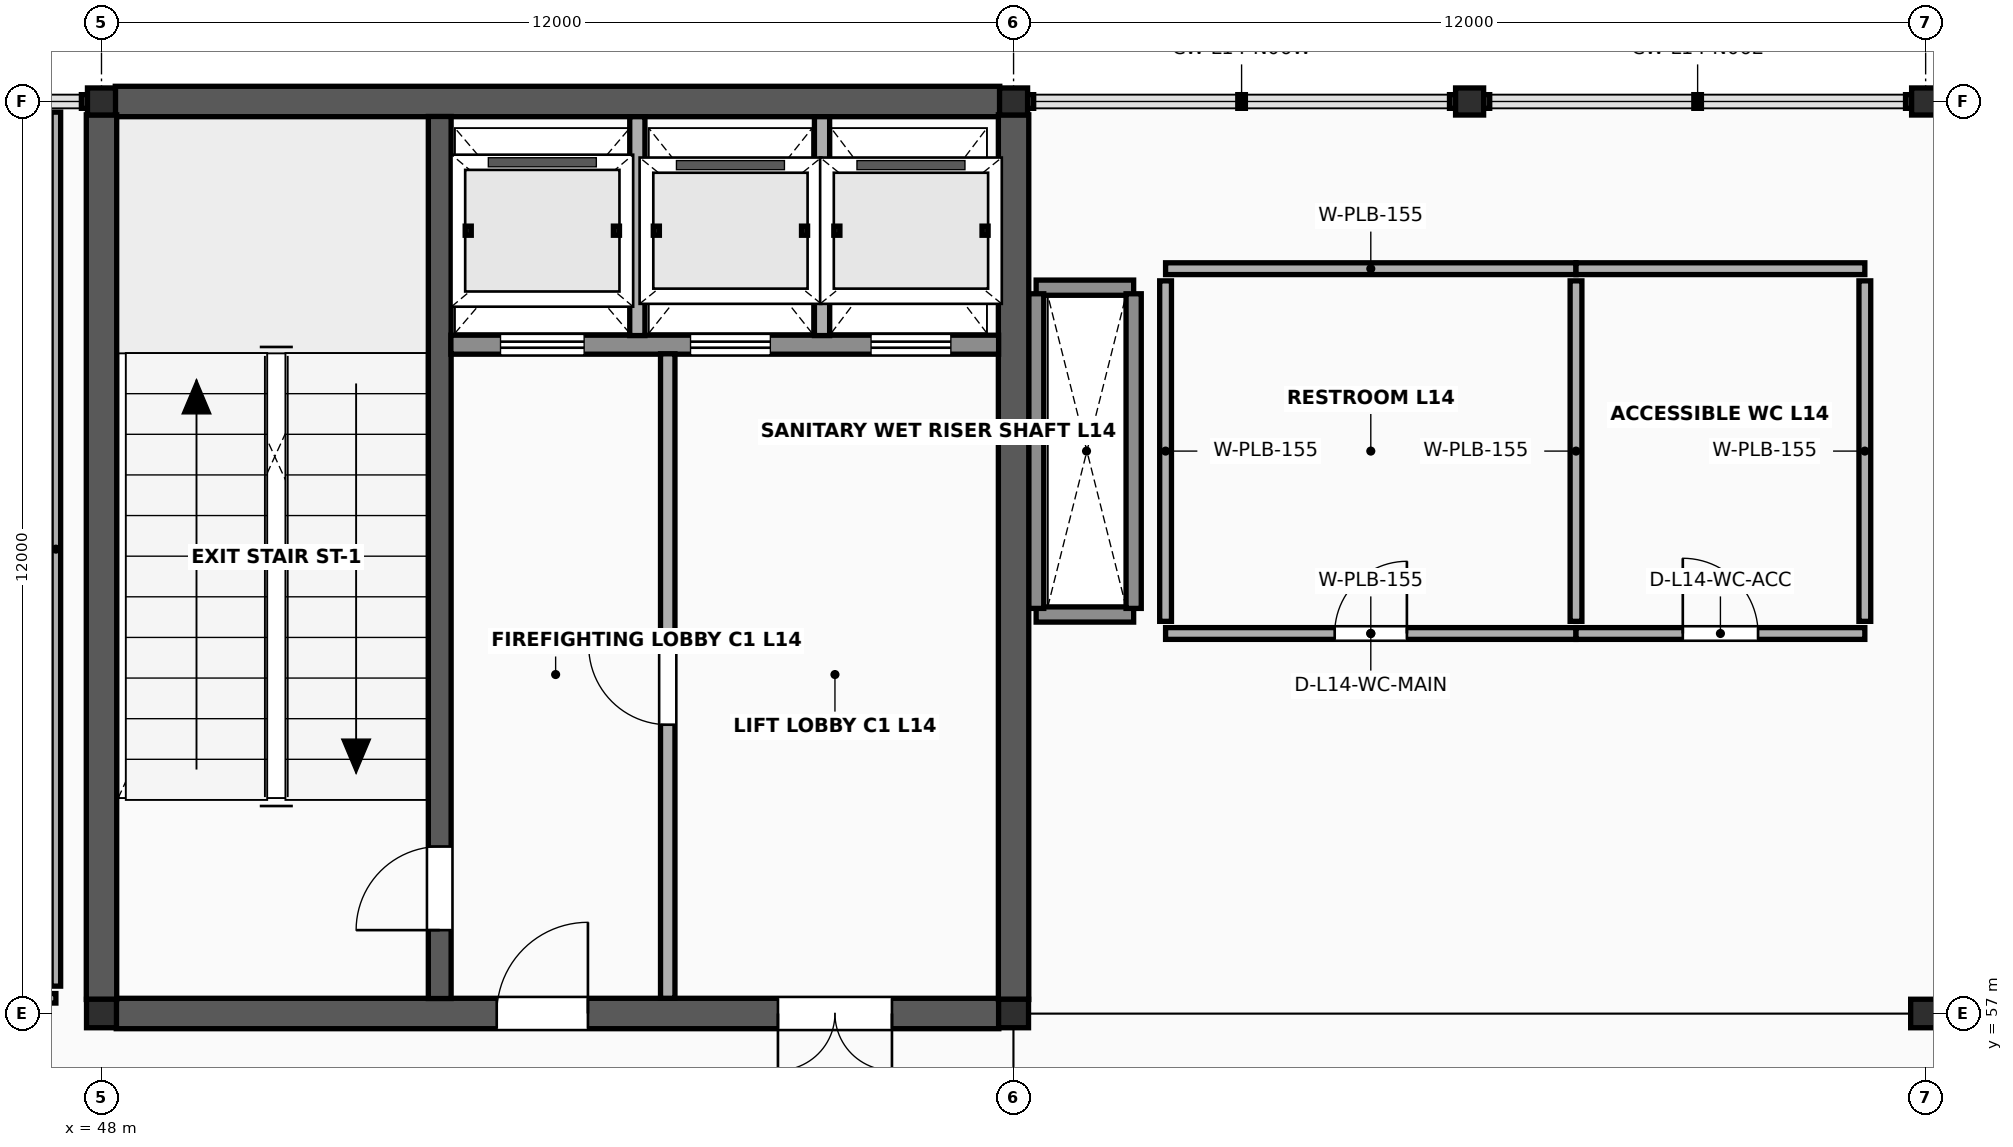
"""IFC4 building model, lengths in metres.
Left out: names, types, materials, properties, quantities, classifications, styles, units other than length and angle.
Written with IfcOpenShell. Run it as: python <this file> out.ifc"""

import sys

from ifc_helpers import new_model, si_unit, direction, frame, frame_2d, origin, origin_2d, place, context, subcontext, project, spatial, rectangle, i_section, extrude, element, fill, save


model = new_model("IFC4")
c1 = context("Model", 3, precision=1e-05, world=origin(), true_north=direction((0.0, 1.0)))
c2 = subcontext(c1, "Body", "Model", "MODEL_VIEW")
j1 = project(units=[si_unit("LENGTHUNIT", "METRE"), si_unit("PLANEANGLEUNIT", "RADIAN")], contexts=[c1])
p1 = place(None, origin())
s1 = spatial("IfcSite", under=j1, at=p1, CompositionType="ELEMENT")
p2 = place(p1, origin())
s2 = spatial("IfcBuilding", under=s1, at=p2, CompositionType="ELEMENT")
p3 = place(p2, frame((0.0, 0.0, 57.6)))
s3 = spatial("IfcBuildingStorey", under=s2, at=p3, CompositionType="ELEMENT", Elevation=57.6)
p4 = place(p3, frame((48.0, 57.0, 0.0), z_axis=(0.0, 0.0, 1.0), x_axis=(1.0, 0.0, 0.0)))
e1 = element("IfcColumn", 1, at=p4, inside=s3, PredefinedType="COLUMN", context=c2, shape_type="SweptSolid", body=[
    extrude(i_section(OverallWidth=0.394, OverallDepth=0.375, WebThickness=0.017, FlangeThickness=0.028, FilletRadius=0.018, at=origin_2d()), origin(), (0.0, 0.0, 1.0), 4.0),
])
p5 = place(p3, frame((48.0, 69.0, 0.0), z_axis=(0.0, 0.0, 1.0), x_axis=(1.0, 0.0, 0.0)))
e2 = element("IfcColumn", 2, at=p5, inside=s3, PredefinedType="COLUMN", context=c2, shape_type="SweptSolid", body=[
    extrude(i_section(OverallWidth=0.369, OverallDepth=0.356, WebThickness=0.011, FlangeThickness=0.018, FilletRadius=0.018, at=origin_2d()), origin(), (0.0, 0.0, 1.0), 4.0),
])
p6 = place(p3, frame((60.0, 57.0, 0.0), z_axis=(0.0, 0.0, 1.0), x_axis=(1.0, 0.0, 0.0)))
e3 = element("IfcColumn", 3, at=p6, inside=s3, PredefinedType="COLUMN", context=c2, shape_type="SweptSolid", body=[
    extrude(i_section(OverallWidth=0.394, OverallDepth=0.375, WebThickness=0.017, FlangeThickness=0.028, FilletRadius=0.018, at=origin_2d()), origin(), (0.0, 0.0, 1.0), 4.0),
])
p7 = place(p3, frame((60.0, 69.0, 0.0), z_axis=(0.0, 0.0, 1.0), x_axis=(1.0, 0.0, 0.0)))
e4 = element("IfcColumn", 4, at=p7, inside=s3, PredefinedType="COLUMN", context=c2, shape_type="SweptSolid", body=[
    extrude(i_section(OverallWidth=0.369, OverallDepth=0.356, WebThickness=0.011, FlangeThickness=0.018, FilletRadius=0.018, at=origin_2d()), origin(), (0.0, 0.0, 1.0), 4.0),
])
p8 = place(p3, frame((72.0, 57.0, 0.0), z_axis=(0.0, 0.0, 1.0), x_axis=(1.0, 0.0, 0.0)))
e5 = element("IfcColumn", 5, at=p8, inside=s3, PredefinedType="COLUMN", context=c2, shape_type="SweptSolid", body=[
    extrude(i_section(OverallWidth=0.394, OverallDepth=0.375, WebThickness=0.017, FlangeThickness=0.028, FilletRadius=0.018, at=origin_2d()), origin(), (0.0, 0.0, 1.0), 4.0),
])
for number, where, z_axis, x_axis in (
    (6, (72.0, 69.0, 0.0), (0.0, 0.0, 1.0), (1.0, 0.0, 0.0)),
    (7, (66.0, 69.0, 0.0), (0.0, 0.0, 1.0), (1.0, 0.0, 0.0)),
):
    element("IfcColumn", number, at=place(p3, frame(where, z_axis=z_axis, x_axis=x_axis)), inside=s3, PredefinedType="COLUMN", context=c2, shape_type="SweptSolid", body=[
        extrude(i_section(OverallWidth=0.369, OverallDepth=0.356, WebThickness=0.011, FlangeThickness=0.018, FilletRadius=0.018, at=origin_2d()), origin(), (0.0, 0.0, 1.0), 4.0),
    ])
for number, where, z_axis, x_axis in (
    (8, (60.297, 62.25, 0.0), (0.0, 0.0, 1.0), (1.0, 0.0, 0.0)),
    (9, (60.297, 66.55, 0.0), (0.0, 0.0, 1.0), (1.0, 0.0, 0.0)),
):
    element("IfcWall", number, at=place(p3, frame(where, z_axis=z_axis, x_axis=x_axis)), inside=s3, PredefinedType="SOLIDWALL", context=c2, shape_type="SweptSolid", body=[
        extrude(rectangle(XDim=1.283, YDim=0.2, at=frame_2d((0.642, 0.0))), origin(), (0.0, 0.0, 1.0), 3.853),
    ])
for number, where, z_axis, x_axis in (
    (10, (60.297, 62.33, 0.0), (0.0, 0.0, 1.0), (0.0, 1.0, 0.0)),
    (11, (61.58, 62.33, 0.0), (0.0, 0.0, 1.0), (0.0, 1.0, 0.0)),
):
    element("IfcWall", number, at=place(p3, frame(where, z_axis=z_axis, x_axis=x_axis)), inside=s3, PredefinedType="SOLIDWALL", context=c2, shape_type="SweptSolid", body=[
        extrude(rectangle(XDim=4.14, YDim=0.2, at=frame_2d((2.07, 0.0))), origin(), (0.0, 0.0, 1.0), 3.853),
    ])
p9 = place(p3, frame((48.194, 57.0, 0.0), z_axis=(0.0, 0.0, 1.0), x_axis=(1.0, 0.0, 0.0)))
e12 = element("IfcWall", 12, at=p9, inside=s3, PredefinedType="SHEAR", context=c2, shape_type="SweptSolid", body=[
    extrude(rectangle(XDim=11.612, YDim=0.4, at=frame_2d((5.806, 0.0))), origin(), (0.0, 0.0, 1.0), 3.853),
])
p10 = place(p9, frame((5.006, 0.0, 0.0)))
e13 = element("IfcOpeningElement", 13, at=p10, cuts=e12, PredefinedType="OPENING", context=c2, shape_type="SweptSolid", body=[
    extrude(rectangle(XDim=1.2, YDim=2.2, at=frame_2d((0.6, 1.1))), frame((0.0, 0.215, 0.0), z_axis=(0.0, -1.0, 0.0), x_axis=(1.0, 0.0, 0.0)), (0.0, 0.0, 1.0), 0.43),
])
p11 = place(p9, frame((8.706, 0.0, 0.0)))
e14 = element("IfcOpeningElement", 14, at=p11, cuts=e12, PredefinedType="OPENING", context=c2, shape_type="SweptSolid", body=[
    extrude(rectangle(XDim=1.5, YDim=2.25, at=frame_2d((0.75, 1.125))), frame((0.0, 0.215, 0.0), z_axis=(0.0, -1.0, 0.0), x_axis=(1.0, 0.0, 0.0)), (0.0, 0.0, 1.0), 0.43),
])
p12 = place(p3, frame((48.181, 69.0, 0.0), z_axis=(0.0, 0.0, 1.0), x_axis=(1.0, 0.0, 0.0)))
e15 = element("IfcWall", 15, at=p12, inside=s3, PredefinedType="SHEAR", context=c2, shape_type="SweptSolid", body=[
    extrude(rectangle(XDim=11.637, YDim=0.4, at=frame_2d((5.819, 0.0))), origin(), (0.0, 0.0, 1.0), 3.853),
])
for number, where, z_axis, x_axis in (
    (16, (48.0, 57.185, 0.0), (0.0, 0.0, 1.0), (0.0, 1.0, 0.0)),
    (17, (60.0, 57.185, 0.0), (0.0, 0.0, 1.0), (0.0, 1.0, 0.0)),
):
    element("IfcWall", number, at=place(p3, frame(where, z_axis=z_axis, x_axis=x_axis)), inside=s3, PredefinedType="SHEAR", context=c2, shape_type="SweptSolid", body=[
        extrude(rectangle(XDim=11.64, YDim=0.4, at=frame_2d((5.82, 0.0))), origin(), (0.0, 0.0, 1.0), 3.853),
    ])
p13 = place(p3, frame((52.45, 57.197, 0.0), z_axis=(0.0, 0.0, 1.0), x_axis=(0.0, 1.0, 0.0)))
e18 = element("IfcWall", 18, at=p13, inside=s3, PredefinedType="SHEAR", context=c2, shape_type="SweptSolid", body=[
    extrude(rectangle(XDim=11.606, YDim=0.3, at=frame_2d((5.803, 0.0))), origin(), (0.0, 0.0, 1.0), 3.853),
])
p14 = place(p13, frame((0.9, 0.0, 0.0)))
e19 = element("IfcOpeningElement", 19, at=p14, cuts=e18, PredefinedType="OPENING", context=c2, shape_type="SweptSolid", body=[
    extrude(rectangle(XDim=1.1, YDim=2.2, at=frame_2d((0.55, 1.1))), frame((0.0, 0.165, 0.0), z_axis=(0.0, -1.0, 0.0), x_axis=(1.0, 0.0, 0.0)), (0.0, 0.0, 1.0), 0.33),
])
p15 = place(p3, frame((52.597, 65.8, 0.0), z_axis=(0.0, 0.0, 1.0), x_axis=(1.0, 0.0, 0.0)))
e20 = element("IfcWall", 20, at=p15, inside=s3, PredefinedType="SOLIDWALL", context=c2, shape_type="SweptSolid", body=[
    extrude(rectangle(XDim=7.206, YDim=0.25, at=frame_2d((3.603, 0.0))), origin(), (0.0, 0.0, 1.0), 3.853),
])
p16 = place(p15, frame((0.653, 0.0, 0.0)))
e21 = element("IfcOpeningElement", 21, at=p16, cuts=e20, PredefinedType="OPENING", context=c2, shape_type="SweptSolid", body=[
    extrude(rectangle(XDim=1.1, YDim=2.24, at=frame_2d((0.55, 1.12))), frame((0.0, 0.14, 0.0), z_axis=(0.0, -1.0, 0.0), x_axis=(1.0, 0.0, 0.0)), (0.0, 0.0, 1.0), 0.28),
])
p17 = place(p15, frame((3.153, 0.0, 0.0)))
e22 = element("IfcOpeningElement", 22, at=p17, cuts=e20, PredefinedType="OPENING", context=c2, shape_type="SweptSolid", body=[
    extrude(rectangle(XDim=1.05, YDim=2.2, at=frame_2d((0.525, 1.1))), frame((0.0, 0.14, 0.0), z_axis=(0.0, -1.0, 0.0), x_axis=(1.0, 0.0, 0.0)), (0.0, 0.0, 1.0), 0.28),
])
p18 = place(p15, frame((5.528, 0.0, 0.0)))
e23 = element("IfcOpeningElement", 23, at=p18, cuts=e20, PredefinedType="OPENING", context=c2, shape_type="SweptSolid", body=[
    extrude(rectangle(XDim=1.05, YDim=2.2, at=frame_2d((0.525, 1.1))), frame((0.0, 0.14, 0.0), z_axis=(0.0, -1.0, 0.0), x_axis=(1.0, 0.0, 0.0)), (0.0, 0.0, 1.0), 0.28),
])
for number, where, z_axis, x_axis in (
    (24, (55.05, 65.92, 0.0), (0.0, 0.0, 1.0), (0.0, 1.0, 0.0)),
    (25, (57.48, 65.92, 0.0), (0.0, 0.0, 1.0), (0.0, 1.0, 0.0)),
):
    element("IfcWall", number, at=place(p3, frame(where, z_axis=z_axis, x_axis=x_axis)), inside=s3, PredefinedType="SOLIDWALL", context=c2, shape_type="SweptSolid", body=[
        extrude(rectangle(XDim=2.88, YDim=0.2, at=frame_2d((1.44, 0.0))), origin(), (0.0, 0.0, 1.0), 3.843),
    ])
p19 = place(p3, frame((55.45, 57.2, 0.0), z_axis=(0.0, 0.0, 1.0), x_axis=(0.0, 1.0, 0.0)))
e26 = element("IfcWall", 26, at=p19, inside=s3, PredefinedType="SOLIDWALL", context=c2, shape_type="SweptSolid", body=[
    extrude(rectangle(XDim=8.48, YDim=0.19, at=frame_2d((4.24, 0.0))), origin(), (0.0, 0.0, 1.0), 3.843),
])
p20 = place(p19, frame((3.6, 0.0, 0.0)))
e27 = element("IfcOpeningElement", 27, at=p20, cuts=e26, PredefinedType="OPENING", context=c2, shape_type="SweptSolid", body=[
    extrude(rectangle(XDim=1.04, YDim=2.18, at=frame_2d((0.52, 1.09))), frame((0.0, 0.11, 0.0), z_axis=(0.0, -1.0, 0.0), x_axis=(1.0, 0.0, 0.0)), (0.0, 0.0, 1.0), 0.22),
])
p21 = place(p3, frame((62.0, 62.0, 0.0), z_axis=(0.0, 0.0, 1.0), x_axis=(1.0, 0.0, 0.0)))
e28 = element("IfcWall", 28, at=p21, inside=s3, PredefinedType="PLUMBINGWALL", context=c2, shape_type="SweptSolid", body=[
    extrude(rectangle(XDim=5.4, YDim=0.155, at=frame_2d((2.7, 0.0))), origin(), (0.0, 0.0, 1.0), 2.88),
])
p22 = place(p21, frame((2.225, 0.0, 0.0)))
e29 = element("IfcOpeningElement", 29, at=p22, cuts=e28, PredefinedType="OPENING", context=c2, shape_type="SweptSolid", body=[
    extrude(rectangle(XDim=0.95, YDim=2.13, at=frame_2d((0.475, 1.065))), frame((0.0, 0.093, 0.0), z_axis=(0.0, -1.0, 0.0), x_axis=(1.0, 0.0, 0.0)), (0.0, 0.0, 1.0), 0.185),
])
p23 = place(p3, frame((62.0, 66.8, 0.0), z_axis=(0.0, 0.0, 1.0), x_axis=(1.0, 0.0, 0.0)))
e30 = element("IfcWall", 30, at=p23, inside=s3, PredefinedType="PLUMBINGWALL", context=c2, shape_type="SweptSolid", body=[
    extrude(rectangle(XDim=5.4, YDim=0.155, at=frame_2d((2.7, 0.0))), origin(), (0.0, 0.0, 1.0), 2.88),
])
for number, where, z_axis, x_axis in (
    (31, (62.0, 62.16, 0.0), (0.0, 0.0, 1.0), (0.0, 1.0, 0.0)),
    (32, (67.4, 62.16, 0.0), (0.0, 0.0, 1.0), (0.0, 1.0, 0.0)),
):
    element("IfcWall", number, at=place(p3, frame(where, z_axis=z_axis, x_axis=x_axis)), inside=s3, PredefinedType="PLUMBINGWALL", context=c2, shape_type="SweptSolid", body=[
        extrude(rectangle(XDim=4.48, YDim=0.155, at=frame_2d((2.24, 0.0))), origin(), (0.0, 0.0, 1.0), 2.88),
    ])
p24 = place(p3, frame((67.4, 62.0, 0.0), z_axis=(0.0, 0.0, 1.0), x_axis=(1.0, 0.0, 0.0)))
e33 = element("IfcWall", 33, at=p24, inside=s3, PredefinedType="PLUMBINGWALL", context=c2, shape_type="SweptSolid", body=[
    extrude(rectangle(XDim=3.8, YDim=0.155, at=frame_2d((1.9, 0.0))), origin(), (0.0, 0.0, 1.0), 2.88),
])
p25 = place(p24, frame((1.405, 0.0, 0.0)))
e34 = element("IfcOpeningElement", 34, at=p25, cuts=e33, PredefinedType="OPENING", context=c2, shape_type="SweptSolid", body=[
    extrude(rectangle(XDim=0.99, YDim=2.15, at=frame_2d((0.495, 1.075))), frame((0.0, 0.093, 0.0), z_axis=(0.0, -1.0, 0.0), x_axis=(1.0, 0.0, 0.0)), (0.0, 0.0, 1.0), 0.185),
])
p26 = place(p3, frame((67.4, 66.8, 0.0), z_axis=(0.0, 0.0, 1.0), x_axis=(1.0, 0.0, 0.0)))
e35 = element("IfcWall", 35, at=p26, inside=s3, PredefinedType="PLUMBINGWALL", context=c2, shape_type="SweptSolid", body=[
    extrude(rectangle(XDim=3.8, YDim=0.155, at=frame_2d((1.9, 0.0))), origin(), (0.0, 0.0, 1.0), 2.88),
])
p27 = place(p3, frame((71.2, 62.16, 0.0), z_axis=(0.0, 0.0, 1.0), x_axis=(0.0, 1.0, 0.0)))
e36 = element("IfcWall", 36, at=p27, inside=s3, PredefinedType="PLUMBINGWALL", context=c2, shape_type="SweptSolid", body=[
    extrude(rectangle(XDim=4.48, YDim=0.155, at=frame_2d((2.24, 0.0))), origin(), (0.0, 0.0, 1.0), 2.88),
])
p28 = place(p3, frame((36.14, 57.2, 0.0), z_axis=(0.0, 0.0, 1.0), x_axis=(1.0, 0.0, 0.0)))
e37 = element("IfcWall", 37, at=p28, inside=s3, PredefinedType="PARTITIONING", context=c2, shape_type="SweptSolid", body=[
    extrude(rectangle(XDim=11.26, YDim=0.125, at=frame_2d((5.63, 0.0))), origin(), (0.0, 0.0, 1.0), 2.88),
])
p29 = place(p28, frame((5.025, 0.0, 0.0)))
e38 = element("IfcOpeningElement", 38, at=p29, cuts=e37, PredefinedType="OPENING", context=c2, shape_type="SweptSolid", body=[
    extrude(rectangle(XDim=1.21, YDim=2.25, at=frame_2d((0.605, 1.125))), frame((0.0, 0.077, 0.0), z_axis=(0.0, -1.0, 0.0), x_axis=(1.0, 0.0, 0.0)), (0.0, 0.0, 1.0), 0.155),
])
p30 = place(p3, frame((47.4, 57.36, 0.0), z_axis=(0.0, 0.0, 1.0), x_axis=(0.0, 1.0, 0.0)))
e39 = element("IfcWall", 39, at=p30, inside=s3, PredefinedType="PARTITIONING", context=c2, shape_type="SweptSolid", body=[
    extrude(rectangle(XDim=11.5, YDim=0.125, at=frame_2d((5.75, 0.0))), origin(), (0.0, 0.0, 1.0), 2.88),
])
p31 = place(p14, origin())
e40 = element("IfcDoor", 40, at=p31, inside=s3, OperationType="SINGLE_SWING_LEFT", PredefinedType="DOOR", context=c2, shape_type="SweptSolid", body=[
    extrude(rectangle(XDim=1.1, YDim=2.2, at=frame_2d((0.55, 1.1))), frame((0.0, 0.025, 0.0), z_axis=(0.0, -1.0, 0.0), x_axis=(1.0, 0.0, 0.0)), (0.0, 0.0, 1.0), 0.05),
])
fill(e19, e40)
p32 = place(p20, origin())
e41 = element("IfcDoor", 41, at=p32, inside=s3, OperationType="SINGLE_SWING_RIGHT", PredefinedType="DOOR", context=c2, shape_type="SweptSolid", body=[
    extrude(rectangle(XDim=1.04, YDim=2.18, at=frame_2d((0.52, 1.09))), frame((0.0, 0.025, 0.0), z_axis=(0.0, -1.0, 0.0), x_axis=(1.0, 0.0, 0.0)), (0.0, 0.0, 1.0), 0.05),
])
fill(e27, e41)
p33 = place(p10, origin())
e42 = element("IfcDoor", 42, at=p33, inside=s3, OperationType="SINGLE_SWING_RIGHT", PredefinedType="DOOR", context=c2, shape_type="SweptSolid", body=[
    extrude(rectangle(XDim=1.2, YDim=2.2, at=frame_2d((0.6, 1.1))), frame((0.0, 0.025, 0.0), z_axis=(0.0, -1.0, 0.0), x_axis=(1.0, 0.0, 0.0)), (0.0, 0.0, 1.0), 0.05),
])
fill(e13, e42)
p34 = place(p11, origin())
e43 = element("IfcDoor", 43, at=p34, inside=s3, OperationType="DOUBLE_DOOR_SINGLE_SWING", PredefinedType="DOOR", context=c2, shape_type="SweptSolid", body=[
    extrude(rectangle(XDim=1.5, YDim=2.25, at=frame_2d((0.75, 1.125))), frame((0.0, 0.025, 0.0), z_axis=(0.0, -1.0, 0.0), x_axis=(1.0, 0.0, 0.0)), (0.0, 0.0, 1.0), 0.05),
])
fill(e14, e43)
p35 = place(p16, origin())
e44 = element("IfcDoor", 44, at=p35, inside=s3, OperationType="SLIDING_TO_LEFT", PredefinedType="USERDEFINED", context=c2, shape_type="SweptSolid", body=[
    extrude(rectangle(XDim=1.1, YDim=2.24, at=frame_2d((0.55, 1.12))), frame((0.0, 0.025, 0.0), z_axis=(0.0, -1.0, 0.0), x_axis=(1.0, 0.0, 0.0)), (0.0, 0.0, 1.0), 0.05),
])
fill(e21, e44)
p36 = place(p17, origin())
e45 = element("IfcDoor", 45, at=p36, inside=s3, OperationType="SLIDING_TO_LEFT", PredefinedType="USERDEFINED", context=c2, shape_type="SweptSolid", body=[
    extrude(rectangle(XDim=1.05, YDim=2.2, at=frame_2d((0.525, 1.1))), frame((0.0, 0.025, 0.0), z_axis=(0.0, -1.0, 0.0), x_axis=(1.0, 0.0, 0.0)), (0.0, 0.0, 1.0), 0.05),
])
fill(e22, e45)
p37 = place(p18, origin())
e46 = element("IfcDoor", 46, at=p37, inside=s3, OperationType="SLIDING_TO_LEFT", PredefinedType="USERDEFINED", context=c2, shape_type="SweptSolid", body=[
    extrude(rectangle(XDim=1.05, YDim=2.2, at=frame_2d((0.525, 1.1))), frame((0.0, 0.025, 0.0), z_axis=(0.0, -1.0, 0.0), x_axis=(1.0, 0.0, 0.0)), (0.0, 0.0, 1.0), 0.05),
])
fill(e23, e46)
p38 = place(p22, origin())
e47 = element("IfcDoor", 47, at=p38, inside=s3, OperationType="SINGLE_SWING_RIGHT", PredefinedType="DOOR", context=c2, shape_type="SweptSolid", body=[
    extrude(rectangle(XDim=0.95, YDim=2.13, at=frame_2d((0.475, 1.065))), frame((0.0, 0.025, 0.0), z_axis=(0.0, -1.0, 0.0), x_axis=(1.0, 0.0, 0.0)), (0.0, 0.0, 1.0), 0.05),
])
fill(e29, e47)
p39 = place(p25, origin())
e48 = element("IfcDoor", 48, at=p39, inside=s3, OperationType="SINGLE_SWING_LEFT", PredefinedType="DOOR", context=c2, shape_type="SweptSolid", body=[
    extrude(rectangle(XDim=0.99, YDim=2.15, at=frame_2d((0.495, 1.075))), frame((0.0, 0.025, 0.0), z_axis=(0.0, -1.0, 0.0), x_axis=(1.0, 0.0, 0.0)), (0.0, 0.0, 1.0), 0.05),
])
fill(e34, e48)
save(model, sys.argv[1])
